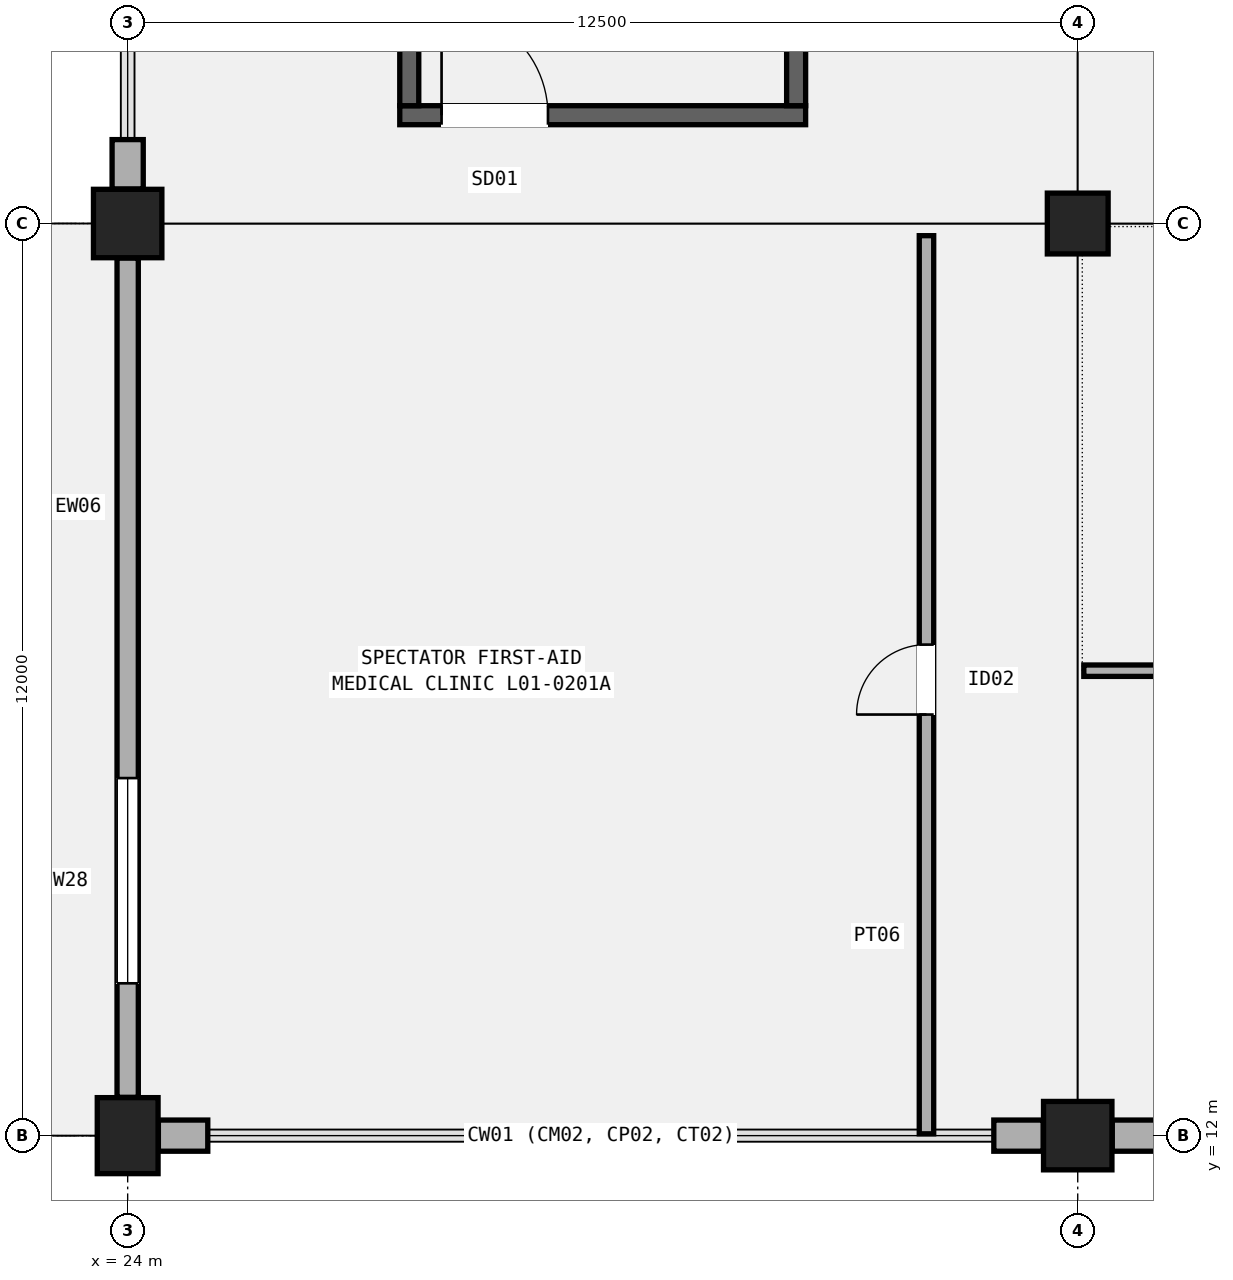
"""IFC4 building model, lengths in metres.
Left out: names, types, materials, properties, quantities, classifications, styles, units other than length and angle.
Written with IfcOpenShell. Run it as: python <this file> out.ifc"""

import sys

from ifc_helpers import new_model, si_unit, direction, frame, frame_2d, origin, origin_2d, place, context, subcontext, project, spatial, rectangle, extrude, element, fill, save


model = new_model("IFC4")
c1 = context("Model", 3, precision=1e-05, world=origin(), true_north=direction((0.0, 1.0)))
c2 = subcontext(c1, "Body", "Model", "MODEL_VIEW")
j1 = project(units=[si_unit("LENGTHUNIT", "METRE"), si_unit("PLANEANGLEUNIT", "RADIAN")], contexts=[c1])
p1 = place(None, origin())
s1 = spatial("IfcSite", under=j1, at=p1, CompositionType="ELEMENT")
p2 = place(p1, origin())
s2 = spatial("IfcBuilding", under=s1, at=p2, CompositionType="ELEMENT")
p3 = place(p2, frame((0.0, 0.0, 5.4)))
s3 = spatial("IfcBuildingStorey", under=s2, at=p3, CompositionType="ELEMENT", Elevation=5.4)
p4 = place(p3, frame((24.0, 12.0, 0.0), z_axis=(0.0, 0.0, 1.0), x_axis=(1.0, 0.0, 0.0)))
e1 = element("IfcColumn", 1, at=p4, inside=s3, PredefinedType="COLUMN", context=c2, shape_type="SweptSolid", body=[
    extrude(rectangle(XDim=0.8, YDim=1.0, at=origin_2d()), origin(), (0.0, 0.0, 1.0), 4.8),
])
for number, where, z_axis, x_axis in (
    (2, (24.0, 24.0, 0.0), (0.0, 0.0, 1.0), (1.0, 0.0, 0.0)),
    (3, (36.5, 12.0, 0.0), (0.0, 0.0, 1.0), (1.0, 0.0, 0.0)),
):
    element("IfcColumn", number, at=place(p3, frame(where, z_axis=z_axis, x_axis=x_axis)), inside=s3, PredefinedType="COLUMN", context=c2, shape_type="SweptSolid", body=[
        extrude(rectangle(XDim=0.9, YDim=0.9, at=origin_2d()), origin(), (0.0, 0.0, 1.0), 4.8),
    ])
p5 = place(p3, frame((36.5, 24.0, 0.0), z_axis=(0.0, 0.0, 1.0), x_axis=(1.0, 0.0, 0.0)))
e4 = element("IfcColumn", 4, at=p5, inside=s3, PredefinedType="COLUMN", context=c2, shape_type="SweptSolid", body=[
    extrude(rectangle(XDim=0.8, YDim=0.8, at=origin_2d()), origin(), (0.0, 0.0, 1.0), 4.8),
])
for number, where, z_axis, x_axis in (
    (5, (24.404, 12.0, 0.0), (0.0, 0.0, 1.0), (1.0, 0.0, 0.0)),
    (6, (35.396, 12.0, 0.0), (0.0, 0.0, 1.0), (1.0, 0.0, 0.0)),
):
    element("IfcWall", number, at=place(p3, frame(where, z_axis=z_axis, x_axis=x_axis)), inside=s3, PredefinedType="SOLIDWALL", context=c2, shape_type="SweptSolid", body=[
        extrude(rectangle(XDim=0.65, YDim=0.41, at=frame_2d((0.325, 0.0))), origin(), (0.0, 0.0, 1.0), 4.2),
    ])
p6 = place(p3, frame((24.0, 12.504, 0.0), z_axis=(0.0, 0.0, 1.0), x_axis=(0.0, 1.0, 0.0)))
e7 = element("IfcWall", 7, at=p6, inside=s3, PredefinedType="SOLIDWALL", context=c2, shape_type="SweptSolid", body=[
    extrude(rectangle(XDim=11.042, YDim=0.28, at=frame_2d((5.521, 0.0))), origin(), (0.0, 0.0, 1.0), 4.2),
])
p7 = place(p6, frame((1.5, 0.0, 0.95)))
e8 = element("IfcOpeningElement", 8, at=p7, cuts=e7, PredefinedType="OPENING", context=c2, shape_type="SweptSolid", body=[
    extrude(rectangle(XDim=2.7, YDim=2.2, at=frame_2d((1.35, 1.1))), frame((0.0, 0.15, 0.0), z_axis=(0.0, -1.0, 0.0), x_axis=(1.0, 0.0, 0.0)), (0.0, 0.0, 1.0), 0.3),
])
for number, where, z_axis, x_axis in (
    (9, (24.0, 24.454, 0.0), (0.0, 0.0, 1.0), (0.0, 1.0, 0.0)),
    (10, (36.954, 12.0, 0.0), (0.0, 0.0, 1.0), (1.0, 0.0, 0.0)),
):
    element("IfcWall", number, at=place(p3, frame(where, z_axis=z_axis, x_axis=x_axis)), inside=s3, PredefinedType="SOLIDWALL", context=c2, shape_type="SweptSolid", body=[
        extrude(rectangle(XDim=0.65, YDim=0.41, at=frame_2d((0.325, 0.0))), origin(), (0.0, 0.0, 1.0), 4.15),
    ])
p8 = place(p3, frame((27.58, 25.425, 0.0), z_axis=(0.0, 0.0, 1.0), x_axis=(1.0, 0.0, 0.0)))
e11 = element("IfcWall", 11, at=p8, inside=s3, PredefinedType="SHEAR", context=c2, shape_type="SweptSolid", body=[
    extrude(rectangle(XDim=5.34, YDim=0.25, at=frame_2d((2.67, 0.0))), origin(), (0.0, 0.0, 1.0), 4.55),
])
p9 = place(p8, frame((0.55, 0.0, 0.0)))
e12 = element("IfcOpeningElement", 12, at=p9, cuts=e11, PredefinedType="OPENING", context=c2, shape_type="SweptSolid", body=[
    extrude(rectangle(XDim=1.4, YDim=2.15, at=frame_2d((0.7, 1.075))), frame((0.0, 0.135, 0.0), z_axis=(0.0, -1.0, 0.0), x_axis=(1.0, 0.0, 0.0)), (0.0, 0.0, 1.0), 0.27),
])
for number, where, z_axis, x_axis in (
    (13, (27.705, 25.55, 0.0), (0.0, 0.0, 1.0), (0.0, 1.0, 0.0)),
    (14, (32.795, 25.55, 0.0), (0.0, 0.0, 1.0), (0.0, 1.0, 0.0)),
):
    element("IfcWall", number, at=place(p3, frame(where, z_axis=z_axis, x_axis=x_axis)), inside=s3, PredefinedType="SHEAR", context=c2, shape_type="SweptSolid", body=[
        extrude(rectangle(XDim=8.9, YDim=0.25, at=frame_2d((4.45, 0.0))), origin(), (0.0, 0.0, 1.0), 4.55),
    ])
p10 = place(p3, frame((34.51, 12.024, 0.0), z_axis=(0.0, 0.0, 1.0), x_axis=(0.0, 1.0, 0.0)))
e15 = element("IfcWall", 15, at=p10, inside=s3, PredefinedType="PARTITIONING", context=c2, shape_type="SweptSolid", body=[
    extrude(rectangle(XDim=11.816, YDim=0.19, at=frame_2d((5.908, 0.0))), origin(), (0.0, 0.0, 1.0), 3.92),
])
p11 = place(p10, frame((5.516, 0.0, 0.0)))
e16 = element("IfcOpeningElement", 16, at=p11, cuts=e15, PredefinedType="OPENING", context=c2, shape_type="SweptSolid", body=[
    extrude(rectangle(XDim=0.92, YDim=2.1, at=frame_2d((0.46, 1.05))), frame((0.0, 0.105, 0.0), z_axis=(0.0, -1.0, 0.0), x_axis=(1.0, 0.0, 0.0)), (0.0, 0.0, 1.0), 0.21),
])
p12 = place(p3, frame((36.58, 18.117, 0.0), z_axis=(0.0, 0.0, 1.0), x_axis=(1.0, 0.0, 0.0)))
e17 = element("IfcWall", 17, at=p12, inside=s3, PredefinedType="PARTITIONING", context=c2, shape_type="SweptSolid", body=[
    extrude(rectangle(XDim=10.355, YDim=0.15, at=frame_2d((5.177, 0.0))), origin(), (0.0, 0.0, 1.0), 3.92),
])
p13 = place(p7, origin())
e18 = element("IfcWindow", 18, at=p13, inside=s3, PartitioningType="SINGLE_PANEL", PredefinedType="WINDOW", context=c2, shape_type="SweptSolid", body=[
    extrude(rectangle(XDim=2.7, YDim=2.2, at=frame_2d((1.35, 1.1))), frame((0.0, 0.03, 0.0), z_axis=(0.0, -1.0, 0.0), x_axis=(1.0, 0.0, 0.0)), (0.0, 0.0, 1.0), 0.06),
])
fill(e8, e18)
p14 = place(p9, origin())
e19 = element("IfcDoor", 19, at=p14, inside=s3, OperationType="SINGLE_SWING_LEFT", PredefinedType="DOOR", context=c2, shape_type="SweptSolid", body=[
    extrude(rectangle(XDim=1.4, YDim=2.15, at=frame_2d((0.7, 1.075))), frame((0.0, 0.025, 0.0), z_axis=(0.0, -1.0, 0.0), x_axis=(1.0, 0.0, 0.0)), (0.0, 0.0, 1.0), 0.05),
])
fill(e12, e19)
p15 = place(p11, origin())
e20 = element("IfcDoor", 20, at=p15, inside=s3, OperationType="SINGLE_SWING_LEFT", PredefinedType="DOOR", context=c2, shape_type="SweptSolid", body=[
    extrude(rectangle(XDim=0.92, YDim=2.1, at=frame_2d((0.46, 1.05))), frame((0.0, 0.025, 0.0), z_axis=(0.0, -1.0, 0.0), x_axis=(1.0, 0.0, 0.0)), (0.0, 0.0, 1.0), 0.05),
])
fill(e16, e20)
save(model, sys.argv[1])
